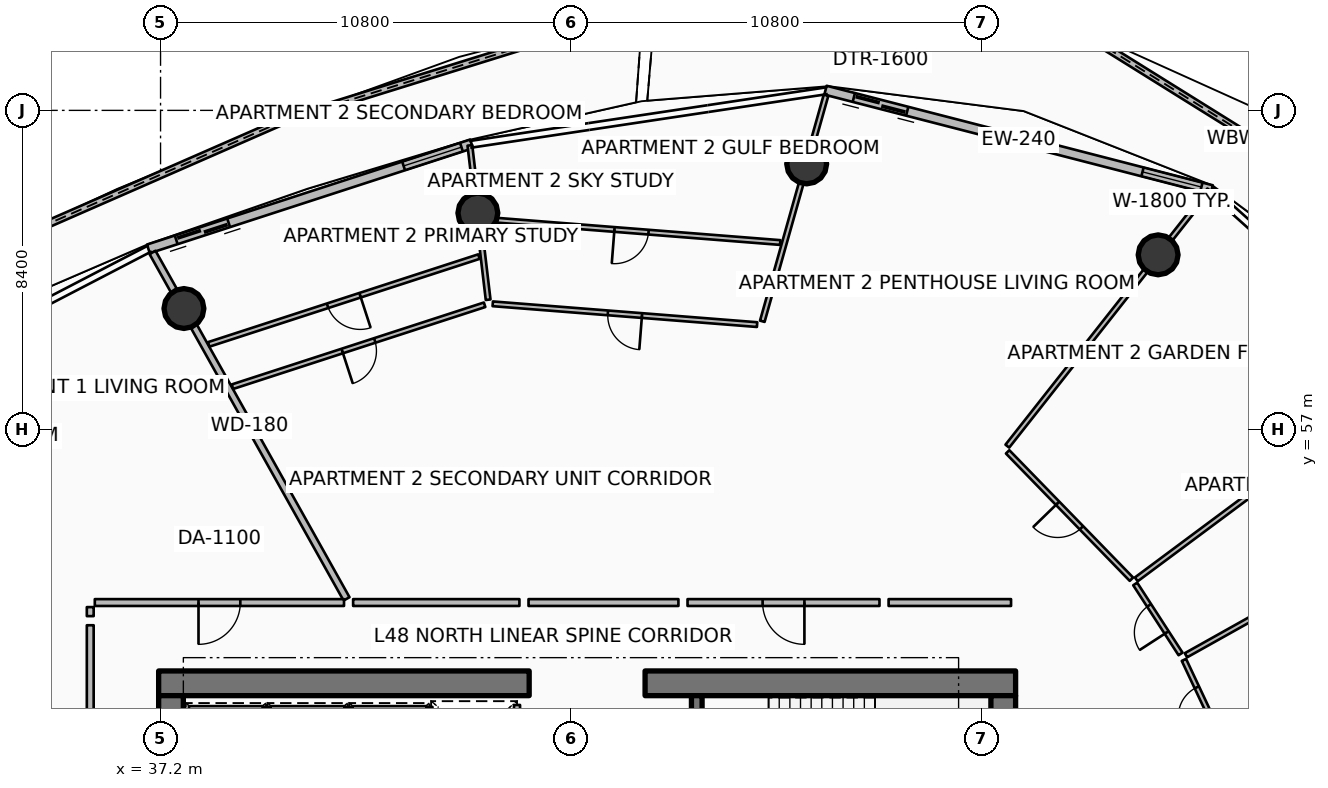
"""IFC4 building model, lengths in metres.
Left out: names, types, materials, properties, quantities, classifications, styles, units other than length and angle.
Written with IfcOpenShell. Run it as: python <this file> out.ifc"""

import sys

from ifc_helpers import new_model, si_unit, direction, frame, frame_2d, origin, origin_2d, place, context, subcontext, project, spatial, polyline, rectangle, circle, outline, extrude, element, fill, save


model = new_model("IFC4")
c1 = context("Model", 3, precision=1e-05, world=origin(), true_north=direction((0.0, 1.0)))
c2 = subcontext(c1, "Body", "Model", "MODEL_VIEW")
j1 = project(units=[si_unit("LENGTHUNIT", "METRE"), si_unit("PLANEANGLEUNIT", "RADIAN")], contexts=[c1])
p1 = place(None, origin())
s1 = spatial("IfcSite", under=j1, at=p1, CompositionType="ELEMENT")
p2 = place(p1, origin())
s2 = spatial("IfcBuilding", under=s1, at=p2, CompositionType="ELEMENT")
p3 = place(p2, frame((0.0, 0.0, 191.55)))
s3 = spatial("IfcBuildingStorey", under=s2, at=p3, CompositionType="ELEMENT", Elevation=191.55)
for number, where, z_axis, x_axis in (
    (1, (37.15, 50.325, 0.0), (0.0, 0.0, 1.0), (1.0, 0.0, 0.0)),
    (2, (49.95, 50.325, 0.0), (0.0, 0.0, 1.0), (1.0, 0.0, 0.0)),
):
    element("IfcWall", number, at=place(p3, frame(where, z_axis=z_axis, x_axis=x_axis)), inside=s3, PredefinedType="SHEAR", context=c2, shape_type="SweptSolid", body=[
        extrude(rectangle(XDim=9.75, YDim=0.65, at=frame_2d((4.875, 0.0))), origin(), (0.0, 0.0, 1.0), 3.75),
    ])
for number, where, z_axis, x_axis in (
    (3, (37.475, 34.0, 0.0), (0.0, 0.0, 1.0), (0.0, 1.0, 0.0)),
    (4, (59.375, 34.0, 0.0), (0.0, 0.0, 1.0), (0.0, 1.0, 0.0)),
):
    element("IfcWall", number, at=place(p3, frame(where, z_axis=z_axis, x_axis=x_axis)), inside=s3, PredefinedType="SHEAR", context=c2, shape_type="SweptSolid", body=[
        extrude(rectangle(XDim=16.0, YDim=0.65, at=frame_2d((8.0, 0.0))), origin(), (0.0, 0.0, 1.0), 3.75),
    ])
p4 = place(p3, frame((51.31, 46.5, 0.0), z_axis=(0.0, 0.0, 1.0), x_axis=(0.0, 1.0, 0.0)))
e5 = element("IfcWall", 5, at=p4, inside=s3, PredefinedType="SHEAR", context=c2, shape_type="SweptSolid", body=[
    extrude(rectangle(XDim=3.5, YDim=0.28, at=frame_2d((1.75, 0.0))), origin(), (0.0, 0.0, 1.0), 3.75),
])
for number, where, z_axis, x_axis in (
    (6, (63.451, 61.599, 0.0), (0.0, 0.0, 1.0), (1.0, 0.0, 0.0)),
    (7, (54.202, 63.992, 0.0), (0.0, 0.0, 1.0), (1.0, 0.0, 0.0)),
    (8, (45.55, 62.7, 0.0), (0.0, 0.0, 1.0), (1.0, 0.0, 0.0)),
    (9, (37.815, 60.186, 0.0), (0.0, 0.0, 1.0), (1.0, 0.0, 0.0)),
):
    element("IfcColumn", number, at=place(p3, frame(where, z_axis=z_axis, x_axis=x_axis)), inside=s3, PredefinedType="COLUMN", context=c2, shape_type="SweptSolid", body=[
        extrude(circle(Radius=0.525, at=origin_2d()), origin(), (0.0, 0.0, 1.0), 3.5),
    ])
p5 = place(p3, frame((70.74, 61.664, 0.0), z_axis=(0.0, 0.0, 1.0), x_axis=(-0.84875531388, 0.528785795158, 0.0)))
e10 = element("IfcWall", 10, at=p5, inside=s3, PredefinedType="PARAPET", context=c2, shape_type="SweptSolid", body=[
    extrude(outline(polyline([(0.0, 0.0), (11.257, 0.0), (11.257, 1.832), (5.628, 1.696), (0.0, 1.497), (0.0, 0.0)])), frame((0.0, 0.09, 0.0), z_axis=(0.0, -1.0, 0.0), x_axis=(1.0, 0.0, 0.0)), (0.0, 0.0, 1.0), 0.18),
])
p6 = place(p3, frame((49.892, 68.071, 0.0), z_axis=(0.0, 0.0, 1.0), x_axis=(-0.954909554677, -0.296896854793, 0.0)))
e11 = element("IfcWall", 11, at=p6, inside=s3, PredefinedType="PARAPET", context=c2, shape_type="SweptSolid", body=[
    extrude(outline(polyline([(0.0, 0.0), (9.736, 0.0), (9.736, 1.348), (4.868, 1.562), (0.0, 1.747), (0.0, 0.0)])), frame((0.0, 0.09, 0.0), z_axis=(0.0, -1.0, 0.0), x_axis=(1.0, 0.0, 0.0)), (0.0, 0.0, 1.0), 0.18),
])
p7 = place(p3, frame((40.37, 65.097, 0.0), z_axis=(0.0, 0.0, 1.0), x_axis=(-0.916057097562, -0.401047869968, 0.0)))
e12 = element("IfcWall", 12, at=p7, inside=s3, PredefinedType="PARAPET", context=c2, shape_type="SweptSolid", body=[
    extrude(outline(polyline([(0.0, 0.0), (9.45, 0.0), (9.45, 1.12), (4.725, 1.182), (0.0, 1.348), (0.0, 0.0)])), frame((0.0, 0.09, 0.0), z_axis=(0.0, -1.0, 0.0), x_axis=(1.0, 0.0, 0.0)), (0.0, 0.0, 1.0), 0.18),
])
p8 = place(p3, frame((64.86, 63.313, 0.0), z_axis=(0.0, 0.0, 1.0), x_axis=(-0.968374028006, 0.249502989727, 0.0)))
e13 = element("IfcWall", 13, at=p8, inside=s3, PredefinedType="SOLIDWALL", context=c2, shape_type="SweptSolid", body=[
    extrude(rectangle(XDim=10.494, YDim=0.24, at=frame_2d((5.247, 0.0))), origin(), (0.0, 0.0, 1.0), 2.45),
])
p9 = place(p8, frame((8.274, 0.0, 0.0)))
e14 = element("IfcOpeningElement", 14, at=p9, cuts=e13, PredefinedType="OPENING", context=c2, shape_type="SweptSolid", body=[
    extrude(rectangle(XDim=1.45, YDim=2.15, at=frame_2d((0.725, 1.075))), frame((0.0, 0.13, 0.0), z_axis=(0.0, -1.0, 0.0), x_axis=(1.0, 0.0, 0.0)), (0.0, 0.0, 1.0), 0.26),
])
p10 = place(p8, frame((0.28, 0.0, 0.65)))
e15 = element("IfcOpeningElement", 15, at=p10, cuts=e13, PredefinedType="OPENING", context=c2, shape_type="SweptSolid", body=[
    extrude(rectangle(XDim=1.6, YDim=1.5, at=frame_2d((0.8, 0.75))), frame((0.0, 0.13, 0.0), z_axis=(0.0, -1.0, 0.0), x_axis=(1.0, 0.0, 0.0)), (0.0, 0.0, 1.0), 0.26),
])
p11 = place(p3, frame((45.384, 64.519, 0.0), z_axis=(0.0, 0.0, 1.0), x_axis=(-0.951058543936, -0.309010753869, 0.0)))
e16 = element("IfcWall", 16, at=p11, inside=s3, PredefinedType="SOLIDWALL", context=c2, shape_type="SweptSolid", body=[
    extrude(rectangle(XDim=8.942, YDim=0.24, at=frame_2d((4.471, 0.0))), origin(), (0.0, 0.0, 1.0), 2.45),
])
p12 = place(p11, frame((6.722, 0.0, 0.0)))
e17 = element("IfcOpeningElement", 17, at=p12, cuts=e16, PredefinedType="OPENING", context=c2, shape_type="SweptSolid", body=[
    extrude(rectangle(XDim=1.45, YDim=2.15, at=frame_2d((0.725, 1.075))), frame((0.0, 0.13, 0.0), z_axis=(0.0, -1.0, 0.0), x_axis=(1.0, 0.0, 0.0)), (0.0, 0.0, 1.0), 0.26),
])
p13 = place(p11, frame((0.28, 0.0, 0.65)))
e18 = element("IfcOpeningElement", 18, at=p13, cuts=e16, PredefinedType="OPENING", context=c2, shape_type="SweptSolid", body=[
    extrude(rectangle(XDim=1.6, YDim=1.5, at=frame_2d((0.8, 0.75))), frame((0.0, 0.13, 0.0), z_axis=(0.0, -1.0, 0.0), x_axis=(1.0, 0.0, 0.0)), (0.0, 0.0, 1.0), 0.26),
])
for number, where, z_axis, x_axis in (
    (19, (39.975, 48.095, 0.0), (0.0, 0.0, 1.0), (0.0, 1.0, 0.0)),
    (20, (42.125, 48.095, 0.0), (0.0, 0.0, 1.0), (0.0, 1.0, 0.0)),
    (21, (44.275, 48.095, 0.0), (0.0, 0.0, 1.0), (0.0, 1.0, 0.0)),
):
    element("IfcWall", number, at=place(p3, frame(where, z_axis=z_axis, x_axis=x_axis)), inside=s3, PredefinedType="PARTITIONING", context=c2, shape_type="SweptSolid", body=[
        extrude(rectangle(XDim=1.61, YDim=0.16, at=frame_2d((0.805, 0.0))), origin(), (0.0, 0.0, 1.0), 3.5),
    ])
p14 = place(p3, frame((46.58, 48.045, 0.0), z_axis=(0.0, 0.0, 1.0), x_axis=(0.0, 1.0, 0.0)))
e22 = element("IfcWall", 22, at=p14, inside=s3, PredefinedType="PARTITIONING", context=c2, shape_type="SweptSolid", body=[
    extrude(rectangle(XDim=1.71, YDim=0.16, at=frame_2d((0.855, 0.0))), origin(), (0.0, 0.0, 1.0), 3.5),
])
p15 = place(p3, frame((42.094, 52.546, 0.0), z_axis=(0.0, 0.0, 1.0), x_axis=(-0.488614041717, 0.872500039104, 0.0)))
e23 = element("IfcWall", 23, at=p15, inside=s3, PredefinedType="PARTITIONING", context=c2, shape_type="SweptSolid", body=[
    extrude(rectangle(XDim=10.448, YDim=0.18, at=frame_2d((5.224, 0.0))), origin(), (0.0, 0.0, 1.0), 2.94),
])
p16 = place(p3, frame((42.028, 52.45, 0.0), z_axis=(0.0, 0.0, 1.0), x_axis=(-1.0, 0.0, 0.0)))
e24 = element("IfcWall", 24, at=p16, inside=s3, PredefinedType="PARTITIONING", context=c2, shape_type="SweptSolid", body=[
    extrude(rectangle(XDim=6.558, YDim=0.18, at=frame_2d((3.279, 0.0))), origin(), (0.0, 0.0, 1.0), 2.94),
])
p17 = place(p16, frame((2.729, 0.0, 0.0)))
e25 = element("IfcOpeningElement", 25, at=p17, cuts=e24, PredefinedType="OPENING", context=c2, shape_type="SweptSolid", body=[
    extrude(rectangle(XDim=1.1, YDim=2.1, at=frame_2d((0.55, 1.05))), frame((0.0, 0.1, 0.0), z_axis=(0.0, -1.0, 0.0), x_axis=(1.0, 0.0, 0.0)), (0.0, 0.0, 1.0), 0.2),
])
p18 = place(p3, frame((35.35, 52.33, 0.0), z_axis=(0.0, 0.0, 1.0), x_axis=(0.0, -1.0, 0.0)))
e26 = element("IfcWall", 26, at=p18, inside=s3, PredefinedType="PARTITIONING", context=c2, shape_type="SweptSolid", body=[
    extrude(rectangle(XDim=0.238, YDim=0.18, at=frame_2d((0.119, 0.0))), origin(), (0.0, 0.0, 1.0), 2.94),
])
p19 = place(p3, frame((35.35, 51.853, 0.0), z_axis=(0.0, 0.0, 1.0), x_axis=(0.0, -1.0, 0.0)))
e27 = element("IfcWall", 27, at=p19, inside=s3, PredefinedType="PARTITIONING", context=c2, shape_type="SweptSolid", body=[
    extrude(rectangle(XDim=6.165, YDim=0.18, at=frame_2d((3.083, 0.0))), origin(), (0.0, 0.0, 1.0), 2.94),
])
p20 = place(p3, frame((56.118, 52.45, 0.0), z_axis=(0.0, 0.0, 1.0), x_axis=(-1.0, 0.0, 0.0)))
e28 = element("IfcWall", 28, at=p20, inside=s3, PredefinedType="PARTITIONING", context=c2, shape_type="SweptSolid", body=[
    extrude(rectangle(XDim=5.051, YDim=0.18, at=frame_2d((2.525, 0.0))), origin(), (0.0, 0.0, 1.0), 2.94),
])
p21 = place(p20, frame((1.975, 0.0, 0.0)))
e29 = element("IfcOpeningElement", 29, at=p21, cuts=e28, PredefinedType="OPENING", context=c2, shape_type="SweptSolid", body=[
    extrude(rectangle(XDim=1.1, YDim=2.1, at=frame_2d((0.55, 1.05))), frame((0.0, 0.1, 0.0), z_axis=(0.0, -1.0, 0.0), x_axis=(1.0, 0.0, 0.0)), (0.0, 0.0, 1.0), 0.2),
])
p22 = place(p3, frame((65.288, 48.688, 0.0), z_axis=(0.0, 0.0, 1.0), x_axis=(0.932645255022, 0.360794717652, 0.0)))
e30 = element("IfcWall", 30, at=p22, inside=s3, PredefinedType="PARTITIONING", context=c2, shape_type="SweptSolid", body=[
    extrude(rectangle(XDim=8.863, YDim=0.125, at=frame_2d((4.432, 0.0))), origin(), (0.0, 0.0, 1.0), 2.94),
])
p23 = place(p3, frame((65.17, 48.728, 0.0), z_axis=(0.0, 0.0, 1.0), x_axis=(-0.42584510915, 0.904796078138, 0.0)))
e31 = element("IfcWall", 31, at=p23, inside=s3, PredefinedType="PARTITIONING", context=c2, shape_type="SweptSolid", body=[
    extrude(rectangle(XDim=2.446, YDim=0.125, at=frame_2d((1.223, 0.0))), origin(), (0.0, 0.0, 1.0), 2.94),
])
p24 = place(p23, frame((0.798, 0.0, 0.0)))
e32 = element("IfcOpeningElement", 32, at=p24, cuts=e31, PredefinedType="OPENING", context=c2, shape_type="SweptSolid", body=[
    extrude(rectangle(XDim=0.85, YDim=2.06, at=frame_2d((0.425, 1.03))), frame((0.0, 0.073, 0.0), z_axis=(0.0, -1.0, 0.0), x_axis=(1.0, 0.0, 0.0)), (0.0, 0.0, 1.0), 0.145),
])
p25 = place(p3, frame((59.58, 52.45, 0.0), z_axis=(0.0, 0.0, 1.0), x_axis=(-1.0, 0.0, 0.0)))
e33 = element("IfcWall", 33, at=p25, inside=s3, PredefinedType="PARTITIONING", context=c2, shape_type="SweptSolid", body=[
    extrude(rectangle(XDim=3.222, YDim=0.18, at=frame_2d((1.611, 0.0))), origin(), (0.0, 0.0, 1.0), 2.94),
])
p26 = place(p3, frame((64.182, 51.062, 0.0), z_axis=(0.0, 0.0, 1.0), x_axis=(0.872500226359, 0.488613707344, 0.0)))
e34 = element("IfcWall", 34, at=p26, inside=s3, PredefinedType="PARTITIONING", context=c2, shape_type="SweptSolid", body=[
    extrude(rectangle(XDim=9.348, YDim=0.125, at=frame_2d((4.674, 0.0))), origin(), (0.0, 0.0, 1.0), 2.94),
])
p27 = place(p3, frame((59.482, 56.565, 0.0), z_axis=(0.0, 0.0, 1.0), x_axis=(0.619076951814, 0.785330330328, 0.0)))
e35 = element("IfcWall", 35, at=p27, inside=s3, PredefinedType="PARTITIONING", context=c2, shape_type="SweptSolid", body=[
    extrude(rectangle(XDim=8.583, YDim=0.125, at=frame_2d((4.292, 0.0))), origin(), (0.0, 0.0, 1.0), 2.94),
])
p28 = place(p3, frame((62.876, 53.06, 0.0), z_axis=(0.0, 0.0, 1.0), x_axis=(0.802513116708, 0.596634475631, 0.0)))
e36 = element("IfcWall", 36, at=p28, inside=s3, PredefinedType="PARTITIONING", context=c2, shape_type="SweptSolid", body=[
    extrude(rectangle(XDim=9.091, YDim=0.125, at=frame_2d((4.545, 0.0))), origin(), (0.0, 0.0, 1.0), 2.94),
])
p29 = place(p3, frame((64.041, 51.097, 0.0), z_axis=(0.0, 0.0, 1.0), x_axis=(-0.543689429225, 0.839286485384, 0.0)))
e37 = element("IfcWall", 37, at=p29, inside=s3, PredefinedType="PARTITIONING", context=c2, shape_type="SweptSolid", body=[
    extrude(rectangle(XDim=2.195, YDim=0.125, at=frame_2d((1.097, 0.0))), origin(), (0.0, 0.0, 1.0), 2.94),
])
p30 = place(p29, frame((0.672, 0.0, 0.0)))
e38 = element("IfcOpeningElement", 38, at=p30, cuts=e37, PredefinedType="OPENING", context=c2, shape_type="SweptSolid", body=[
    extrude(rectangle(XDim=0.85, YDim=2.06, at=frame_2d((0.425, 1.03))), frame((0.0, 0.073, 0.0), z_axis=(0.0, -1.0, 0.0), x_axis=(1.0, 0.0, 0.0)), (0.0, 0.0, 1.0), 0.145),
])
p31 = place(p3, frame((62.748, 53.064, 0.0), z_axis=(0.0, 0.0, 1.0), x_axis=(-0.697059745536, 0.717013048106, 0.0)))
e39 = element("IfcWall", 39, at=p31, inside=s3, PredefinedType="PARTITIONING", context=c2, shape_type="SweptSolid", body=[
    extrude(rectangle(XDim=4.674, YDim=0.125, at=frame_2d((2.337, 0.0))), origin(), (0.0, 0.0, 1.0), 2.94),
])
p32 = place(p31, frame((1.887, 0.0, 0.0)))
e40 = element("IfcOpeningElement", 40, at=p32, cuts=e39, PredefinedType="OPENING", context=c2, shape_type="SweptSolid", body=[
    extrude(rectangle(XDim=0.9, YDim=2.08, at=frame_2d((0.45, 1.04))), frame((0.0, 0.073, 0.0), z_axis=(0.0, -1.0, 0.0), x_axis=(1.0, 0.0, 0.0)), (0.0, 0.0, 1.0), 0.145),
])
p33 = place(p3, frame((50.827, 52.45, 0.0), z_axis=(0.0, 0.0, 1.0), x_axis=(-1.0, 0.0, 0.0)))
e41 = element("IfcWall", 41, at=p33, inside=s3, PredefinedType="PARTITIONING", context=c2, shape_type="SweptSolid", body=[
    extrude(rectangle(XDim=3.944, YDim=0.18, at=frame_2d((1.972, 0.0))), origin(), (0.0, 0.0, 1.0), 2.94),
])
p34 = place(p3, frame((53.034, 59.851, 0.0), z_axis=(0.0, 0.0, 1.0), x_axis=(0.271437645754, 0.96245602729, 0.0)))
e42 = element("IfcWall", 42, at=p34, inside=s3, PredefinedType="PARTITIONING", context=c2, shape_type="SweptSolid", body=[
    extrude(rectangle(XDim=6.18, YDim=0.125, at=frame_2d((3.09, 0.0))), origin(), (0.0, 0.0, 1.0), 2.94),
])
p35 = place(p3, frame((52.898, 59.763, 0.0), z_axis=(0.0, 0.0, 1.0), x_axis=(-0.996915822173, 0.078478299552, 0.0)))
e43 = element("IfcWall", 43, at=p35, inside=s3, PredefinedType="PARTITIONING", context=c2, shape_type="SweptSolid", body=[
    extrude(rectangle(XDim=6.978, YDim=0.125, at=frame_2d((3.489, 0.0))), origin(), (0.0, 0.0, 1.0), 2.94),
])
p36 = place(p35, frame((3.039, 0.0, 0.0)))
e44 = element("IfcOpeningElement", 44, at=p36, cuts=e43, PredefinedType="OPENING", context=c2, shape_type="SweptSolid", body=[
    extrude(rectangle(XDim=0.9, YDim=2.08, at=frame_2d((0.45, 1.04))), frame((0.0, 0.073, 0.0), z_axis=(0.0, -1.0, 0.0), x_axis=(1.0, 0.0, 0.0)), (0.0, 0.0, 1.0), 0.145),
])
p37 = place(p3, frame((53.507, 61.923, 0.0), z_axis=(0.0, 0.0, 1.0), x_axis=(-0.996916671393, 0.078467511105, 0.0)))
e45 = element("IfcWall", 45, at=p37, inside=s3, PredefinedType="PARTITIONING", context=c2, shape_type="SweptSolid", body=[
    extrude(rectangle(XDim=7.853, YDim=0.125, at=frame_2d((3.927, 0.0))), origin(), (0.0, 0.0, 1.0), 2.94),
])
p38 = place(p37, frame((3.477, 0.0, 0.0)))
e46 = element("IfcOpeningElement", 46, at=p38, cuts=e45, PredefinedType="OPENING", context=c2, shape_type="SweptSolid", body=[
    extrude(rectangle(XDim=0.9, YDim=2.08, at=frame_2d((0.45, 1.04))), frame((0.0, 0.073, 0.0), z_axis=(0.0, -1.0, 0.0), x_axis=(1.0, 0.0, 0.0)), (0.0, 0.0, 1.0), 0.145),
])
p39 = place(p3, frame((46.643, 52.45, 0.0), z_axis=(0.0, 0.0, 1.0), x_axis=(-1.0, 0.0, 0.0)))
e47 = element("IfcWall", 47, at=p39, inside=s3, PredefinedType="PARTITIONING", context=c2, shape_type="SweptSolid", body=[
    extrude(rectangle(XDim=4.376, YDim=0.18, at=frame_2d((2.188, 0.0))), origin(), (0.0, 0.0, 1.0), 2.94),
])
p40 = place(p3, frame((45.82, 60.418, 0.0), z_axis=(0.0, 0.0, 1.0), x_axis=(-0.117520306907, 0.993070479606, 0.0)))
e48 = element("IfcWall", 48, at=p40, inside=s3, PredefinedType="PARTITIONING", context=c2, shape_type="SweptSolid", body=[
    extrude(rectangle(XDim=4.088, YDim=0.125, at=frame_2d((2.044, 0.0))), origin(), (0.0, 0.0, 1.0), 2.94),
])
p41 = place(p3, frame((45.727, 60.285, 0.0), z_axis=(0.0, 0.0, 1.0), x_axis=(-0.951056178842, -0.309018032946, 0.0)))
e49 = element("IfcWall", 49, at=p41, inside=s3, PredefinedType="PARTITIONING", context=c2, shape_type="SweptSolid", body=[
    extrude(rectangle(XDim=6.978, YDim=0.125, at=frame_2d((3.489, 0.0))), origin(), (0.0, 0.0, 1.0), 2.94),
])
p42 = place(p41, frame((3.039, 0.0, 0.0)))
e50 = element("IfcOpeningElement", 50, at=p42, cuts=e49, PredefinedType="OPENING", context=c2, shape_type="SweptSolid", body=[
    extrude(rectangle(XDim=0.9, YDim=2.08, at=frame_2d((0.45, 1.04))), frame((0.0, 0.073, 0.0), z_axis=(0.0, -1.0, 0.0), x_axis=(1.0, 0.0, 0.0)), (0.0, 0.0, 1.0), 0.145),
])
p43 = place(p3, frame((45.577, 61.552, 0.0), z_axis=(0.0, 0.0, 1.0), x_axis=(-0.95105638647, -0.309017393935, 0.0)))
e51 = element("IfcWall", 51, at=p43, inside=s3, PredefinedType="PARTITIONING", context=c2, shape_type="SweptSolid", body=[
    extrude(rectangle(XDim=7.476, YDim=0.125, at=frame_2d((3.738, 0.0))), origin(), (0.0, 0.0, 1.0), 2.94),
])
p44 = place(p43, frame((3.288, 0.0, 0.0)))
e52 = element("IfcOpeningElement", 52, at=p44, cuts=e51, PredefinedType="OPENING", context=c2, shape_type="SweptSolid", body=[
    extrude(rectangle(XDim=0.9, YDim=2.08, at=frame_2d((0.45, 1.04))), frame((0.0, 0.073, 0.0), z_axis=(0.0, -1.0, 0.0), x_axis=(1.0, 0.0, 0.0)), (0.0, 0.0, 1.0), 0.145),
])
p45 = place(p9, origin())
e53 = element("IfcDoor", 53, at=p45, inside=s3, OperationType="DOUBLE_DOOR_SLIDING", PredefinedType="DOOR", context=c2, shape_type="SweptSolid", body=[
    extrude(rectangle(XDim=1.45, YDim=2.15, at=frame_2d((0.725, 1.075))), frame((0.0, 0.025, 0.0), z_axis=(0.0, -1.0, 0.0), x_axis=(1.0, 0.0, 0.0)), (0.0, 0.0, 1.0), 0.05),
])
fill(e14, e53)
p46 = place(p10, origin())
e54 = element("IfcWindow", 54, at=p46, inside=s3, PartitioningType="SINGLE_PANEL", PredefinedType="WINDOW", context=c2, shape_type="SweptSolid", body=[
    extrude(rectangle(XDim=1.6, YDim=1.5, at=frame_2d((0.8, 0.75))), frame((0.0, 0.03, 0.0), z_axis=(0.0, -1.0, 0.0), x_axis=(1.0, 0.0, 0.0)), (0.0, 0.0, 1.0), 0.06),
])
fill(e15, e54)
p47 = place(p12, origin())
e55 = element("IfcDoor", 55, at=p47, inside=s3, OperationType="DOUBLE_DOOR_SLIDING", PredefinedType="DOOR", context=c2, shape_type="SweptSolid", body=[
    extrude(rectangle(XDim=1.45, YDim=2.15, at=frame_2d((0.725, 1.075))), frame((0.0, 0.025, 0.0), z_axis=(0.0, -1.0, 0.0), x_axis=(1.0, 0.0, 0.0)), (0.0, 0.0, 1.0), 0.05),
])
fill(e17, e55)
p48 = place(p13, origin())
e56 = element("IfcWindow", 56, at=p48, inside=s3, PartitioningType="SINGLE_PANEL", PredefinedType="WINDOW", context=c2, shape_type="SweptSolid", body=[
    extrude(rectangle(XDim=1.6, YDim=1.5, at=frame_2d((0.8, 0.75))), frame((0.0, 0.03, 0.0), z_axis=(0.0, -1.0, 0.0), x_axis=(1.0, 0.0, 0.0)), (0.0, 0.0, 1.0), 0.06),
])
fill(e18, e56)
p49 = place(p17, origin())
e57 = element("IfcDoor", 57, at=p49, inside=s3, OperationType="SINGLE_SWING_RIGHT", PredefinedType="DOOR", context=c2, shape_type="SweptSolid", body=[
    extrude(rectangle(XDim=1.1, YDim=2.1, at=frame_2d((0.55, 1.05))), frame((0.0, 0.025, 0.0), z_axis=(0.0, -1.0, 0.0), x_axis=(1.0, 0.0, 0.0)), (0.0, 0.0, 1.0), 0.05),
])
fill(e25, e57)
p50 = place(p21, origin())
e58 = element("IfcDoor", 58, at=p50, inside=s3, OperationType="SINGLE_SWING_LEFT", PredefinedType="DOOR", context=c2, shape_type="SweptSolid", body=[
    extrude(rectangle(XDim=1.1, YDim=2.1, at=frame_2d((0.55, 1.05))), frame((0.0, 0.025, 0.0), z_axis=(0.0, -1.0, 0.0), x_axis=(1.0, 0.0, 0.0)), (0.0, 0.0, 1.0), 0.05),
])
fill(e29, e58)
p51 = place(p24, origin())
e59 = element("IfcDoor", 59, at=p51, inside=s3, OperationType="SINGLE_SWING_LEFT", PredefinedType="DOOR", context=c2, shape_type="SweptSolid", body=[
    extrude(rectangle(XDim=0.85, YDim=2.06, at=frame_2d((0.425, 1.03))), frame((0.0, 0.025, 0.0), z_axis=(0.0, -1.0, 0.0), x_axis=(1.0, 0.0, 0.0)), (0.0, 0.0, 1.0), 0.05),
])
fill(e32, e59)
p52 = place(p30, origin())
e60 = element("IfcDoor", 60, at=p52, inside=s3, OperationType="SINGLE_SWING_LEFT", PredefinedType="DOOR", context=c2, shape_type="SweptSolid", body=[
    extrude(rectangle(XDim=0.85, YDim=2.06, at=frame_2d((0.425, 1.03))), frame((0.0, 0.025, 0.0), z_axis=(0.0, -1.0, 0.0), x_axis=(1.0, 0.0, 0.0)), (0.0, 0.0, 1.0), 0.05),
])
fill(e38, e60)
p53 = place(p32, origin())
e61 = element("IfcDoor", 61, at=p53, inside=s3, OperationType="SINGLE_SWING_RIGHT", PredefinedType="DOOR", context=c2, shape_type="SweptSolid", body=[
    extrude(rectangle(XDim=0.9, YDim=2.08, at=frame_2d((0.45, 1.04))), frame((0.0, 0.025, 0.0), z_axis=(0.0, -1.0, 0.0), x_axis=(1.0, 0.0, 0.0)), (0.0, 0.0, 1.0), 0.05),
])
fill(e40, e61)
p54 = place(p36, origin())
e62 = element("IfcDoor", 62, at=p54, inside=s3, OperationType="SINGLE_SWING_LEFT", PredefinedType="DOOR", context=c2, shape_type="SweptSolid", body=[
    extrude(rectangle(XDim=0.9, YDim=2.08, at=frame_2d((0.45, 1.04))), frame((0.0, 0.025, 0.0), z_axis=(0.0, -1.0, 0.0), x_axis=(1.0, 0.0, 0.0)), (0.0, 0.0, 1.0), 0.05),
])
fill(e44, e62)
p55 = place(p38, origin())
e63 = element("IfcDoor", 63, at=p55, inside=s3, OperationType="SINGLE_SWING_RIGHT", PredefinedType="DOOR", context=c2, shape_type="SweptSolid", body=[
    extrude(rectangle(XDim=0.9, YDim=2.08, at=frame_2d((0.45, 1.04))), frame((0.0, 0.025, 0.0), z_axis=(0.0, -1.0, 0.0), x_axis=(1.0, 0.0, 0.0)), (0.0, 0.0, 1.0), 0.05),
])
fill(e46, e63)
p56 = place(p42, origin())
e64 = element("IfcDoor", 64, at=p56, inside=s3, OperationType="SINGLE_SWING_RIGHT", PredefinedType="DOOR", context=c2, shape_type="SweptSolid", body=[
    extrude(rectangle(XDim=0.9, YDim=2.08, at=frame_2d((0.45, 1.04))), frame((0.0, 0.025, 0.0), z_axis=(0.0, -1.0, 0.0), x_axis=(1.0, 0.0, 0.0)), (0.0, 0.0, 1.0), 0.05),
])
fill(e50, e64)
p57 = place(p44, origin())
e65 = element("IfcDoor", 65, at=p57, inside=s3, OperationType="SINGLE_SWING_LEFT", PredefinedType="DOOR", context=c2, shape_type="SweptSolid", body=[
    extrude(rectangle(XDim=0.9, YDim=2.08, at=frame_2d((0.45, 1.04))), frame((0.0, 0.025, 0.0), z_axis=(0.0, -1.0, 0.0), x_axis=(1.0, 0.0, 0.0)), (0.0, 0.0, 1.0), 0.05),
])
fill(e52, e65)
save(model, sys.argv[1])
